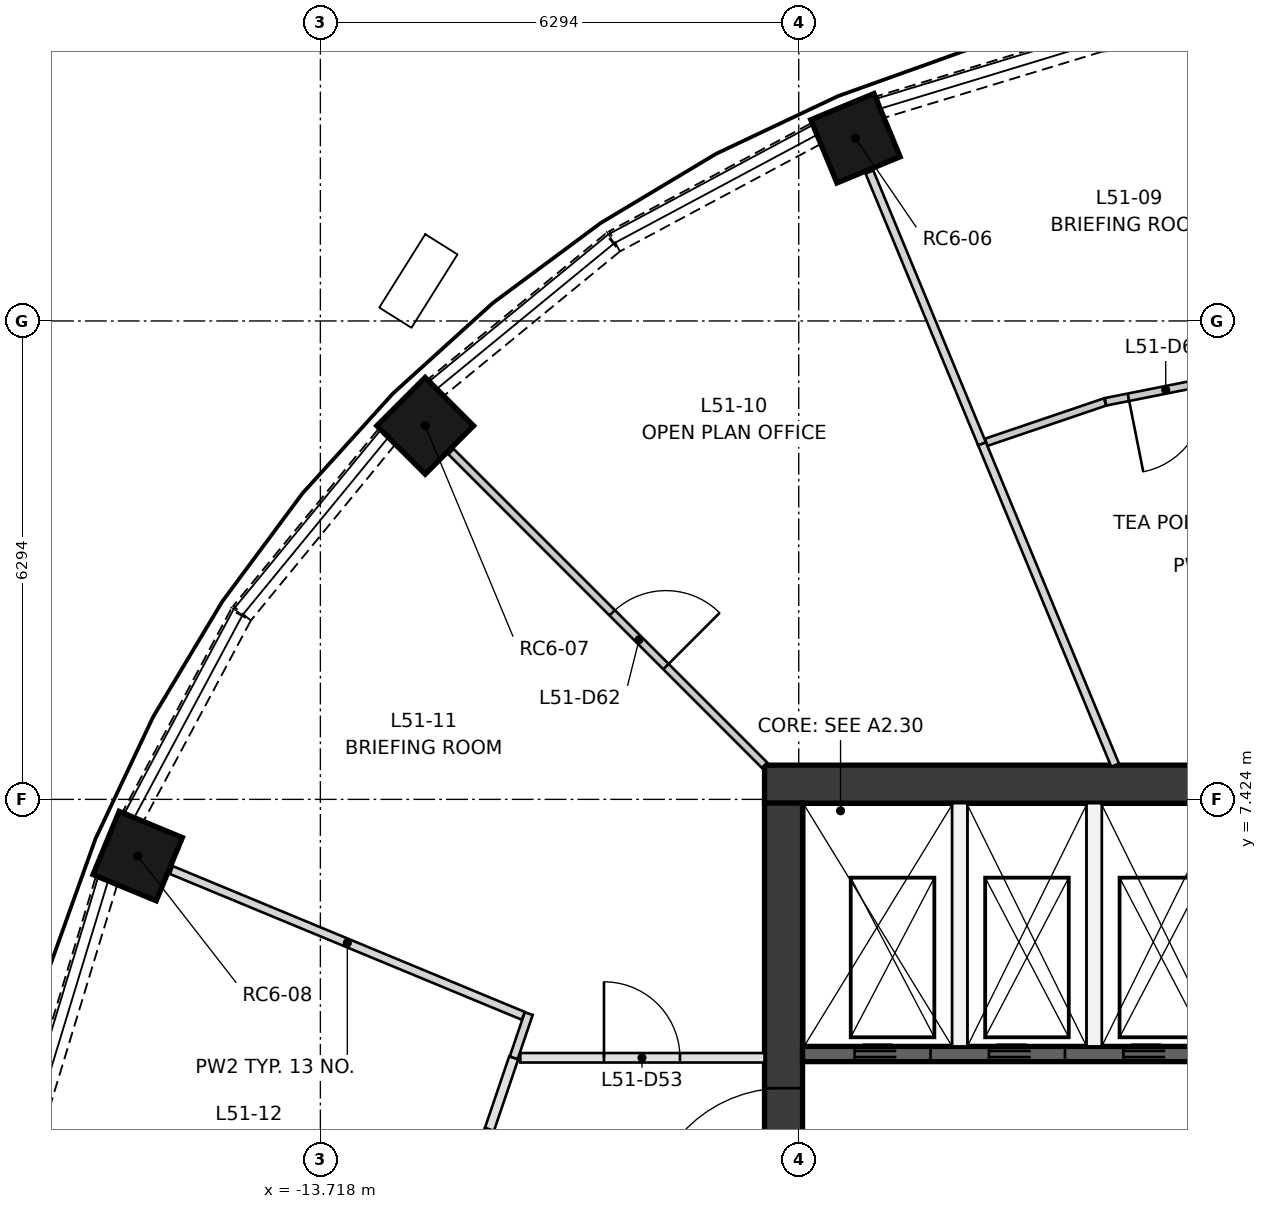
"""IFC4 building model, lengths in metres.
Left out: names, types, materials, properties, quantities, classifications, styles, units other than length and angle.
Written with IfcOpenShell. Run it as: python <this file> out.ifc"""

import sys

from ifc_helpers import new_model, si_unit, direction, frame, frame_2d, origin, origin_2d, place, context, subcontext, project, spatial, rectangle, extrude, element, fill, save


model = new_model("IFC4")
c1 = context("Model", 3, precision=1e-05, world=origin(), true_north=direction((0.0, 1.0)))
c2 = subcontext(c1, "Body", "Model", "MODEL_VIEW")
j1 = project(units=[si_unit("LENGTHUNIT", "METRE"), si_unit("PLANEANGLEUNIT", "RADIAN")], contexts=[c1])
p1 = place(None, origin())
s1 = spatial("IfcSite", under=j1, at=p1, CompositionType="ELEMENT")
p2 = place(p1, origin())
s2 = spatial("IfcBuilding", under=s1, at=p2, CompositionType="ELEMENT")
p3 = place(p2, frame((0.0, 0.0, 191.0)))
s3 = spatial("IfcBuildingStorey", under=s2, at=p3, CompositionType="ELEMENT", Elevation=191.0)
for number, where, z_axis, x_axis in (
    (1, (-6.678, 16.122, 0.0), (0.0, 0.0, 1.0), (-0.383, 0.924, 0.0)),
    (2, (-12.339, 12.339, 0.0), (0.0, 0.0, 1.0), (-0.707, 0.707, 0.0)),
    (3, (-16.122, 6.678, 0.0), (0.0, 0.0, 1.0), (-0.924, 0.383, 0.0)),
):
    element("IfcColumn", number, at=place(p3, frame(where, z_axis=z_axis, x_axis=x_axis)), inside=s3, PredefinedType="COLUMN", context=c2, shape_type="SweptSolid", body=[
        extrude(rectangle(XDim=0.9, YDim=0.9, at=origin_2d()), origin(), (0.0, 0.0, 1.0), 2.85),
    ])
p4 = place(p3, frame((-7.874, 7.624, 0.0), z_axis=(0.0, 0.0, 1.0), x_axis=(1.0, 0.0, 0.0)))
e4 = element("IfcWall", 4, at=p4, inside=s3, PredefinedType="SHEAR", context=c2, shape_type="SweptSolid", body=[
    extrude(rectangle(XDim=15.748, YDim=0.5, at=frame_2d((7.874, 0.0))), origin(), (0.0, 0.0, 1.0), 3.35),
])
p5 = place(p3, frame((-7.624, -7.374, 0.0), z_axis=(0.0, 0.0, 1.0), x_axis=(0.0, 1.0, 0.0)))
e5 = element("IfcWall", 5, at=p5, inside=s3, PredefinedType="SHEAR", context=c2, shape_type="SweptSolid", body=[
    extrude(rectangle(XDim=14.748, YDim=0.5, at=frame_2d((7.374, 0.0))), origin(), (0.0, 0.0, 1.0), 3.35),
])
p6 = place(p5, frame((6.874, 0.0, 0.0)))
e6 = element("IfcOpeningElement", 6, at=p6, cuts=e5, PredefinedType="OPENING", context=c2, shape_type="SweptSolid", body=[
    extrude(rectangle(XDim=1.0, YDim=2.1, at=frame_2d((0.5, 1.05))), frame((0.0, 0.26, 0.0), z_axis=(0.0, -1.0, 0.0), x_axis=(1.0, 0.0, 0.0)), (0.0, 0.0, 1.0), 0.52),
])
p7 = place(p5, frame((3.75, 0.0, 0.0)))
e7 = element("IfcOpeningElement", 7, at=p7, cuts=e5, PredefinedType="OPENING", context=c2, shape_type="SweptSolid", body=[
    extrude(rectangle(XDim=1.8, YDim=2.1, at=frame_2d((0.9, 1.05))), frame((0.0, 0.26, 0.0), z_axis=(0.0, -1.0, 0.0), x_axis=(1.0, 0.0, 0.0)), (0.0, 0.0, 1.0), 0.52),
])
p8 = place(p5, frame((9.198, 0.0, 0.0)))
e8 = element("IfcOpeningElement", 8, at=p8, cuts=e5, PredefinedType="OPENING", context=c2, shape_type="SweptSolid", body=[
    extrude(rectangle(XDim=1.8, YDim=2.1, at=frame_2d((0.9, 1.05))), frame((0.0, 0.26, 0.0), z_axis=(0.0, -1.0, 0.0), x_axis=(1.0, 0.0, 0.0)), (0.0, 0.0, 1.0), 0.52),
])
p9 = place(p3, frame((-7.374, 4.074, 0.0), z_axis=(0.0, 0.0, 1.0), x_axis=(1.0, 0.0, 0.0)))
e9 = element("IfcWall", 9, at=p9, inside=s3, PredefinedType="SHEAR", context=c2, shape_type="SweptSolid", body=[
    extrude(rectangle(XDim=7.374, YDim=0.2, at=frame_2d((3.687, 0.0))), origin(), (0.0, 0.0, 1.0), 3.0),
])
p10 = place(p9, frame((0.684, 0.0, 0.0)))
e10 = element("IfcOpeningElement", 10, at=p10, cuts=e9, PredefinedType="OPENING", context=c2, shape_type="SweptSolid", body=[
    extrude(rectangle(XDim=1.0, YDim=2.1, at=frame_2d((0.5, 1.05))), frame((0.0, 0.11, 0.0), z_axis=(0.0, -1.0, 0.0), x_axis=(1.0, 0.0, 0.0)), (0.0, 0.0, 1.0), 0.22),
])
p11 = place(p9, frame((2.453, 0.0, 0.0)))
e11 = element("IfcOpeningElement", 11, at=p11, cuts=e9, PredefinedType="OPENING", context=c2, shape_type="SweptSolid", body=[
    extrude(rectangle(XDim=1.0, YDim=2.1, at=frame_2d((0.5, 1.05))), frame((0.0, 0.11, 0.0), z_axis=(0.0, -1.0, 0.0), x_axis=(1.0, 0.0, 0.0)), (0.0, 0.0, 1.0), 0.22),
])
p12 = place(p9, frame((4.221, 0.0, 0.0)))
e12 = element("IfcOpeningElement", 12, at=p12, cuts=e9, PredefinedType="OPENING", context=c2, shape_type="SweptSolid", body=[
    extrude(rectangle(XDim=1.0, YDim=2.1, at=frame_2d((0.5, 1.05))), frame((0.0, 0.11, 0.0), z_axis=(0.0, -1.0, 0.0), x_axis=(1.0, 0.0, 0.0)), (0.0, 0.0, 1.0), 0.22),
])
p13 = place(p9, frame((5.99, 0.0, 0.0)))
e13 = element("IfcOpeningElement", 13, at=p13, cuts=e9, PredefinedType="OPENING", context=c2, shape_type="SweptSolid", body=[
    extrude(rectangle(XDim=1.0, YDim=2.1, at=frame_2d((0.5, 1.05))), frame((0.0, 0.11, 0.0), z_axis=(0.0, -1.0, 0.0), x_axis=(1.0, 0.0, 0.0)), (0.0, 0.0, 1.0), 0.22),
])
for number, where, z_axis, x_axis in (
    (14, (-5.305, 4.174, 0.0), (0.0, 0.0, 1.0), (0.0, 1.0, 0.0)),
    (15, (-3.537, 4.174, 0.0), (0.0, 0.0, 1.0), (0.0, 1.0, 0.0)),
):
    element("IfcWall", number, at=place(p3, frame(where, z_axis=z_axis, x_axis=x_axis)), inside=s3, PredefinedType="PARTITIONING", context=c2, shape_type="SweptSolid", body=[
        extrude(rectangle(XDim=3.2, YDim=0.2, at=frame_2d((1.6, 0.0))), origin(), (0.0, 0.0, 1.0), 3.0),
    ])
p14 = place(p3, frame((-3.477, 17.405, 0.0), z_axis=(0.0, 0.0, 1.0), x_axis=(-0.95687774785, -0.290490921835, 0.0)))
e16 = element("IfcWall", 16, at=p14, inside=s3, PredefinedType="SOLIDWALL", context=c2, shape_type="SweptSolid", body=[
    extrude(rectangle(XDim=2.999, YDim=0.3, at=frame_2d((1.5, 0.0))), origin(), (0.0, 0.0, 1.0), 0.9),
])
p15 = place(p3, frame((-7.204, 16.179, 0.0), z_axis=(0.0, 0.0, 1.0), x_axis=(-0.881827169278, -0.471572734074, 0.0)))
e17 = element("IfcWall", 17, at=p15, inside=s3, PredefinedType="SOLIDWALL", context=c2, shape_type="SweptSolid", body=[
    extrude(rectangle(XDim=2.998, YDim=0.3, at=frame_2d((1.499, 0.0))), origin(), (0.0, 0.0, 1.0), 0.9),
])
for number, where, z_axis, x_axis in (
    (18, (-9.873, 14.749, 0.0), (0.0, 0.0, 1.0), (-0.773, -0.634, 0.0)),
    (19, (-12.846, 12.191, 0.0), (0.0, 0.0, 1.0), (-0.634, -0.773, 0.0)),
):
    element("IfcWall", number, at=place(p3, frame(where, z_axis=z_axis, x_axis=x_axis)), inside=s3, PredefinedType="SOLIDWALL", context=c2, shape_type="SweptSolid", body=[
        extrude(rectangle(XDim=2.999, YDim=0.3, at=frame_2d((1.5, 0.0))), origin(), (0.0, 0.0, 1.0), 0.9),
    ])
p16 = place(p3, frame((-14.765, 9.848, 0.0), z_axis=(0.0, 0.0, 1.0), x_axis=(-0.471572734074, -0.881827169278, 0.0)))
e20 = element("IfcWall", 20, at=p16, inside=s3, PredefinedType="SOLIDWALL", context=c2, shape_type="SweptSolid", body=[
    extrude(rectangle(XDim=2.998, YDim=0.3, at=frame_2d((1.499, 0.0))), origin(), (0.0, 0.0, 1.0), 0.9),
])
p17 = place(p3, frame((-16.533, 6.347, 0.0), z_axis=(0.0, 0.0, 1.0), x_axis=(-0.290490921835, -0.95687774785, 0.0)))
e21 = element("IfcWall", 21, at=p17, inside=s3, PredefinedType="SOLIDWALL", context=c2, shape_type="SweptSolid", body=[
    extrude(rectangle(XDim=2.999, YDim=0.3, at=frame_2d((1.5, 0.0))), origin(), (0.0, 0.0, 1.0), 0.9),
])
p18 = place(p3, frame((-11.087, 4.024, 0.0), z_axis=(0.0, 0.0, 1.0), x_axis=(1.0, 0.0, 0.0)))
e22 = element("IfcWall", 22, at=p18, inside=s3, PredefinedType="PARTITIONING", context=c2, shape_type="SweptSolid", body=[
    extrude(rectangle(XDim=3.213, YDim=0.125, at=frame_2d((1.606, 0.0))), origin(), (0.0, 0.0, 1.0), 3.0),
])
p19 = place(p18, frame((1.1, 0.0, 0.0)))
e23 = element("IfcOpeningElement", 23, at=p19, cuts=e22, PredefinedType="OPENING", context=c2, shape_type="SweptSolid", body=[
    extrude(rectangle(XDim=1.0, YDim=2.1, at=frame_2d((0.5, 1.05))), frame((0.0, 0.073, 0.0), z_axis=(0.0, -1.0, 0.0), x_axis=(1.0, 0.0, 0.0)), (0.0, 0.0, 1.0), 0.145),
])
p20 = place(p3, frame((-11.797, 1.557, 0.0), z_axis=(0.0, 0.0, 1.0), x_axis=(0.195054687935, 0.98079236779, 0.0)))
e24 = element("IfcWall", 24, at=p20, inside=s3, PredefinedType="PARTITIONING", context=c2, shape_type="SweptSolid", body=[
    extrude(rectangle(XDim=1.548, YDim=0.125, at=frame_2d((0.774, 0.0))), origin(), (0.0, 0.0, 1.0), 3.0),
])
p21 = place(p3, frame((-11.493, 3.084, 0.0), z_axis=(0.0, 0.0, 1.0), x_axis=(0.321457698768, 0.946923939872, 0.0)))
e25 = element("IfcWall", 25, at=p21, inside=s3, PredefinedType="PARTITIONING", context=c2, shape_type="SweptSolid", body=[
    extrude(rectangle(XDim=0.993, YDim=0.125, at=frame_2d((0.497, 0.0))), origin(), (0.0, 0.0, 1.0), 3.0),
])
p22 = place(p3, frame((-4.958, 12.122, 0.0), z_axis=(0.0, 0.0, 1.0), x_axis=(0.94694015461, 0.321409930755, 0.0)))
e26 = element("IfcWall", 26, at=p22, inside=s3, PredefinedType="PARTITIONING", context=c2, shape_type="SweptSolid", body=[
    extrude(rectangle(XDim=1.652, YDim=0.1, at=frame_2d((0.826, 0.0))), origin(), (0.0, 0.0, 1.0), 3.0),
])
p23 = place(p3, frame((-1.713, 12.987, 0.0), z_axis=(0.0, 0.0, 1.0), x_axis=(-0.980783695828, -0.195098288043, 0.0)))
e27 = element("IfcWall", 27, at=p23, inside=s3, PredefinedType="PARTITIONING", context=c2, shape_type="SweptSolid", body=[
    extrude(rectangle(XDim=1.707, YDim=0.1, at=frame_2d((0.854, 0.0))), origin(), (0.0, 0.0, 1.0), 3.0),
])
p24 = place(p23, frame((0.4, 0.0, 0.0)))
e28 = element("IfcOpeningElement", 28, at=p24, cuts=e27, PredefinedType="OPENING", context=c2, shape_type="SweptSolid", body=[
    extrude(rectangle(XDim=1.0, YDim=2.1, at=frame_2d((0.5, 1.05))), frame((0.0, 0.06, 0.0), z_axis=(0.0, -1.0, 0.0), x_axis=(1.0, 0.0, 0.0)), (0.0, 0.0, 1.0), 0.12),
])
p25 = place(p3, frame((-3.261, 7.874, 0.0), z_axis=(0.0, 0.0, 1.0), x_axis=(-0.382701956612, 0.923871859299, 0.0)))
e29 = element("IfcWall", 29, at=p25, inside=s3, PredefinedType="PARTITIONING", context=c2, shape_type="SweptSolid", body=[
    extrude(rectangle(XDim=4.577, YDim=0.11, at=frame_2d((2.289, 0.0))), origin(), (0.0, 0.0, 1.0), 3.0),
])
p26 = place(p3, frame((-5.013, 12.103, 0.0), z_axis=(0.0, 0.0, 1.0), x_axis=(-0.382674944996, 0.923883048049, 0.0)))
e30 = element("IfcWall", 30, at=p26, inside=s3, PredefinedType="PARTITIONING", context=c2, shape_type="SweptSolid", body=[
    extrude(rectangle(XDim=3.87, YDim=0.11, at=frame_2d((1.935, 0.0))), origin(), (0.0, 0.0, 1.0), 3.0),
])
p27 = place(p3, frame((-12.0, 12.0, 0.0), z_axis=(0.0, 0.0, 1.0), x_axis=(0.707106781187, -0.707106781187, 0.0)))
e31 = element("IfcWall", 31, at=p27, inside=s3, PredefinedType="PARTITIONING", context=c2, shape_type="SweptSolid", body=[
    extrude(rectangle(XDim=5.834, YDim=0.1, at=frame_2d((2.917, 0.0))), origin(), (0.0, 0.0, 1.0), 3.0),
])
p28 = place(p27, frame((3.0, 0.0, 0.0)))
e32 = element("IfcOpeningElement", 32, at=p28, cuts=e31, PredefinedType="OPENING", context=c2, shape_type="SweptSolid", body=[
    extrude(rectangle(XDim=1.0, YDim=2.1, at=frame_2d((0.5, 1.05))), frame((0.0, 0.06, 0.0), z_axis=(0.0, -1.0, 0.0), x_axis=(1.0, 0.0, 0.0)), (0.0, 0.0, 1.0), 0.12),
])
p29 = place(p3, frame((-11.174, 4.024, 0.0), z_axis=(0.0, 0.0, 1.0), x_axis=(0.321232679022, 0.947000298801, 0.0)))
e33 = element("IfcWall", 33, at=p29, inside=s3, PredefinedType="PARTITIONING", context=c2, shape_type="SweptSolid", body=[
    extrude(rectangle(XDim=0.614, YDim=0.11, at=frame_2d((0.307, 0.0))), origin(), (0.0, 0.0, 1.0), 3.0),
])
p30 = place(p3, frame((-11.049, 4.576, 0.0), z_axis=(0.0, 0.0, 1.0), x_axis=(-0.923874912391, 0.382694586132, 0.0)))
e34 = element("IfcWall", 34, at=p30, inside=s3, PredefinedType="PARTITIONING", context=c2, shape_type="SweptSolid", body=[
    extrude(rectangle(XDim=5.011, YDim=0.11, at=frame_2d((2.506, 0.0))), origin(), (0.0, 0.0, 1.0), 3.0),
])
p31 = place(p10, frame((1.0, 0.0, 0.0), z_axis=(0.0, 0.0, 1.0), x_axis=(-1.0, 0.0, 0.0)))
e35 = element("IfcDoor", 35, at=p31, inside=s3, OperationType="DOUBLE_DOOR_SLIDING", PredefinedType="DOOR", context=c2, shape_type="SweptSolid", body=[
    extrude(rectangle(XDim=1.0, YDim=2.1, at=frame_2d((0.5, 1.05))), frame((0.0, 0.025, 0.0), z_axis=(0.0, -1.0, 0.0), x_axis=(1.0, 0.0, 0.0)), (0.0, 0.0, 1.0), 0.05),
])
fill(e10, e35)
p32 = place(p11, frame((1.0, 0.0, 0.0), z_axis=(0.0, 0.0, 1.0), x_axis=(-1.0, 0.0, 0.0)))
e36 = element("IfcDoor", 36, at=p32, inside=s3, OperationType="DOUBLE_DOOR_SLIDING", PredefinedType="DOOR", context=c2, shape_type="SweptSolid", body=[
    extrude(rectangle(XDim=1.0, YDim=2.1, at=frame_2d((0.5, 1.05))), frame((0.0, 0.025, 0.0), z_axis=(0.0, -1.0, 0.0), x_axis=(1.0, 0.0, 0.0)), (0.0, 0.0, 1.0), 0.05),
])
fill(e11, e36)
p33 = place(p12, frame((1.0, 0.0, 0.0), z_axis=(0.0, 0.0, 1.0), x_axis=(-1.0, 0.0, 0.0)))
e37 = element("IfcDoor", 37, at=p33, inside=s3, OperationType="DOUBLE_DOOR_SLIDING", PredefinedType="DOOR", context=c2, shape_type="SweptSolid", body=[
    extrude(rectangle(XDim=1.0, YDim=2.1, at=frame_2d((0.5, 1.05))), frame((0.0, 0.025, 0.0), z_axis=(0.0, -1.0, 0.0), x_axis=(1.0, 0.0, 0.0)), (0.0, 0.0, 1.0), 0.05),
])
fill(e12, e37)
p34 = place(p8, origin())
e38 = element("IfcDoor", 38, at=p34, inside=s3, OperationType="DOUBLE_DOOR_SINGLE_SWING", PredefinedType="DOOR", context=c2, shape_type="SweptSolid", body=[
    extrude(rectangle(XDim=1.8, YDim=2.1, at=frame_2d((0.9, 1.05))), frame((0.0, 0.025, 0.0), z_axis=(0.0, -1.0, 0.0), x_axis=(1.0, 0.0, 0.0)), (0.0, 0.0, 1.0), 0.05),
])
fill(e8, e38)
p35 = place(p19, origin())
e39 = element("IfcDoor", 39, at=p35, inside=s3, OperationType="SINGLE_SWING_LEFT", PredefinedType="DOOR", context=c2, shape_type="SweptSolid", body=[
    extrude(rectangle(XDim=1.0, YDim=2.1, at=frame_2d((0.5, 1.05))), frame((0.0, 0.025, 0.0), z_axis=(0.0, -1.0, 0.0), x_axis=(1.0, 0.0, 0.0)), (0.0, 0.0, 1.0), 0.05),
])
fill(e23, e39)
p36 = place(p24, origin())
e40 = element("IfcDoor", 40, at=p36, inside=s3, OperationType="SINGLE_SWING_RIGHT", PredefinedType="DOOR", context=c2, shape_type="SweptSolid", body=[
    extrude(rectangle(XDim=1.0, YDim=2.1, at=frame_2d((0.5, 1.05))), frame((0.0, 0.025, 0.0), z_axis=(0.0, -1.0, 0.0), x_axis=(1.0, 0.0, 0.0)), (0.0, 0.0, 1.0), 0.05),
])
fill(e28, e40)
p37 = place(p28, origin())
e41 = element("IfcDoor", 41, at=p37, inside=s3, OperationType="SINGLE_SWING_RIGHT", PredefinedType="DOOR", context=c2, shape_type="SweptSolid", body=[
    extrude(rectangle(XDim=1.0, YDim=2.1, at=frame_2d((0.5, 1.05))), frame((0.0, 0.025, 0.0), z_axis=(0.0, -1.0, 0.0), x_axis=(1.0, 0.0, 0.0)), (0.0, 0.0, 1.0), 0.05),
])
fill(e32, e41)
save(model, sys.argv[1])
